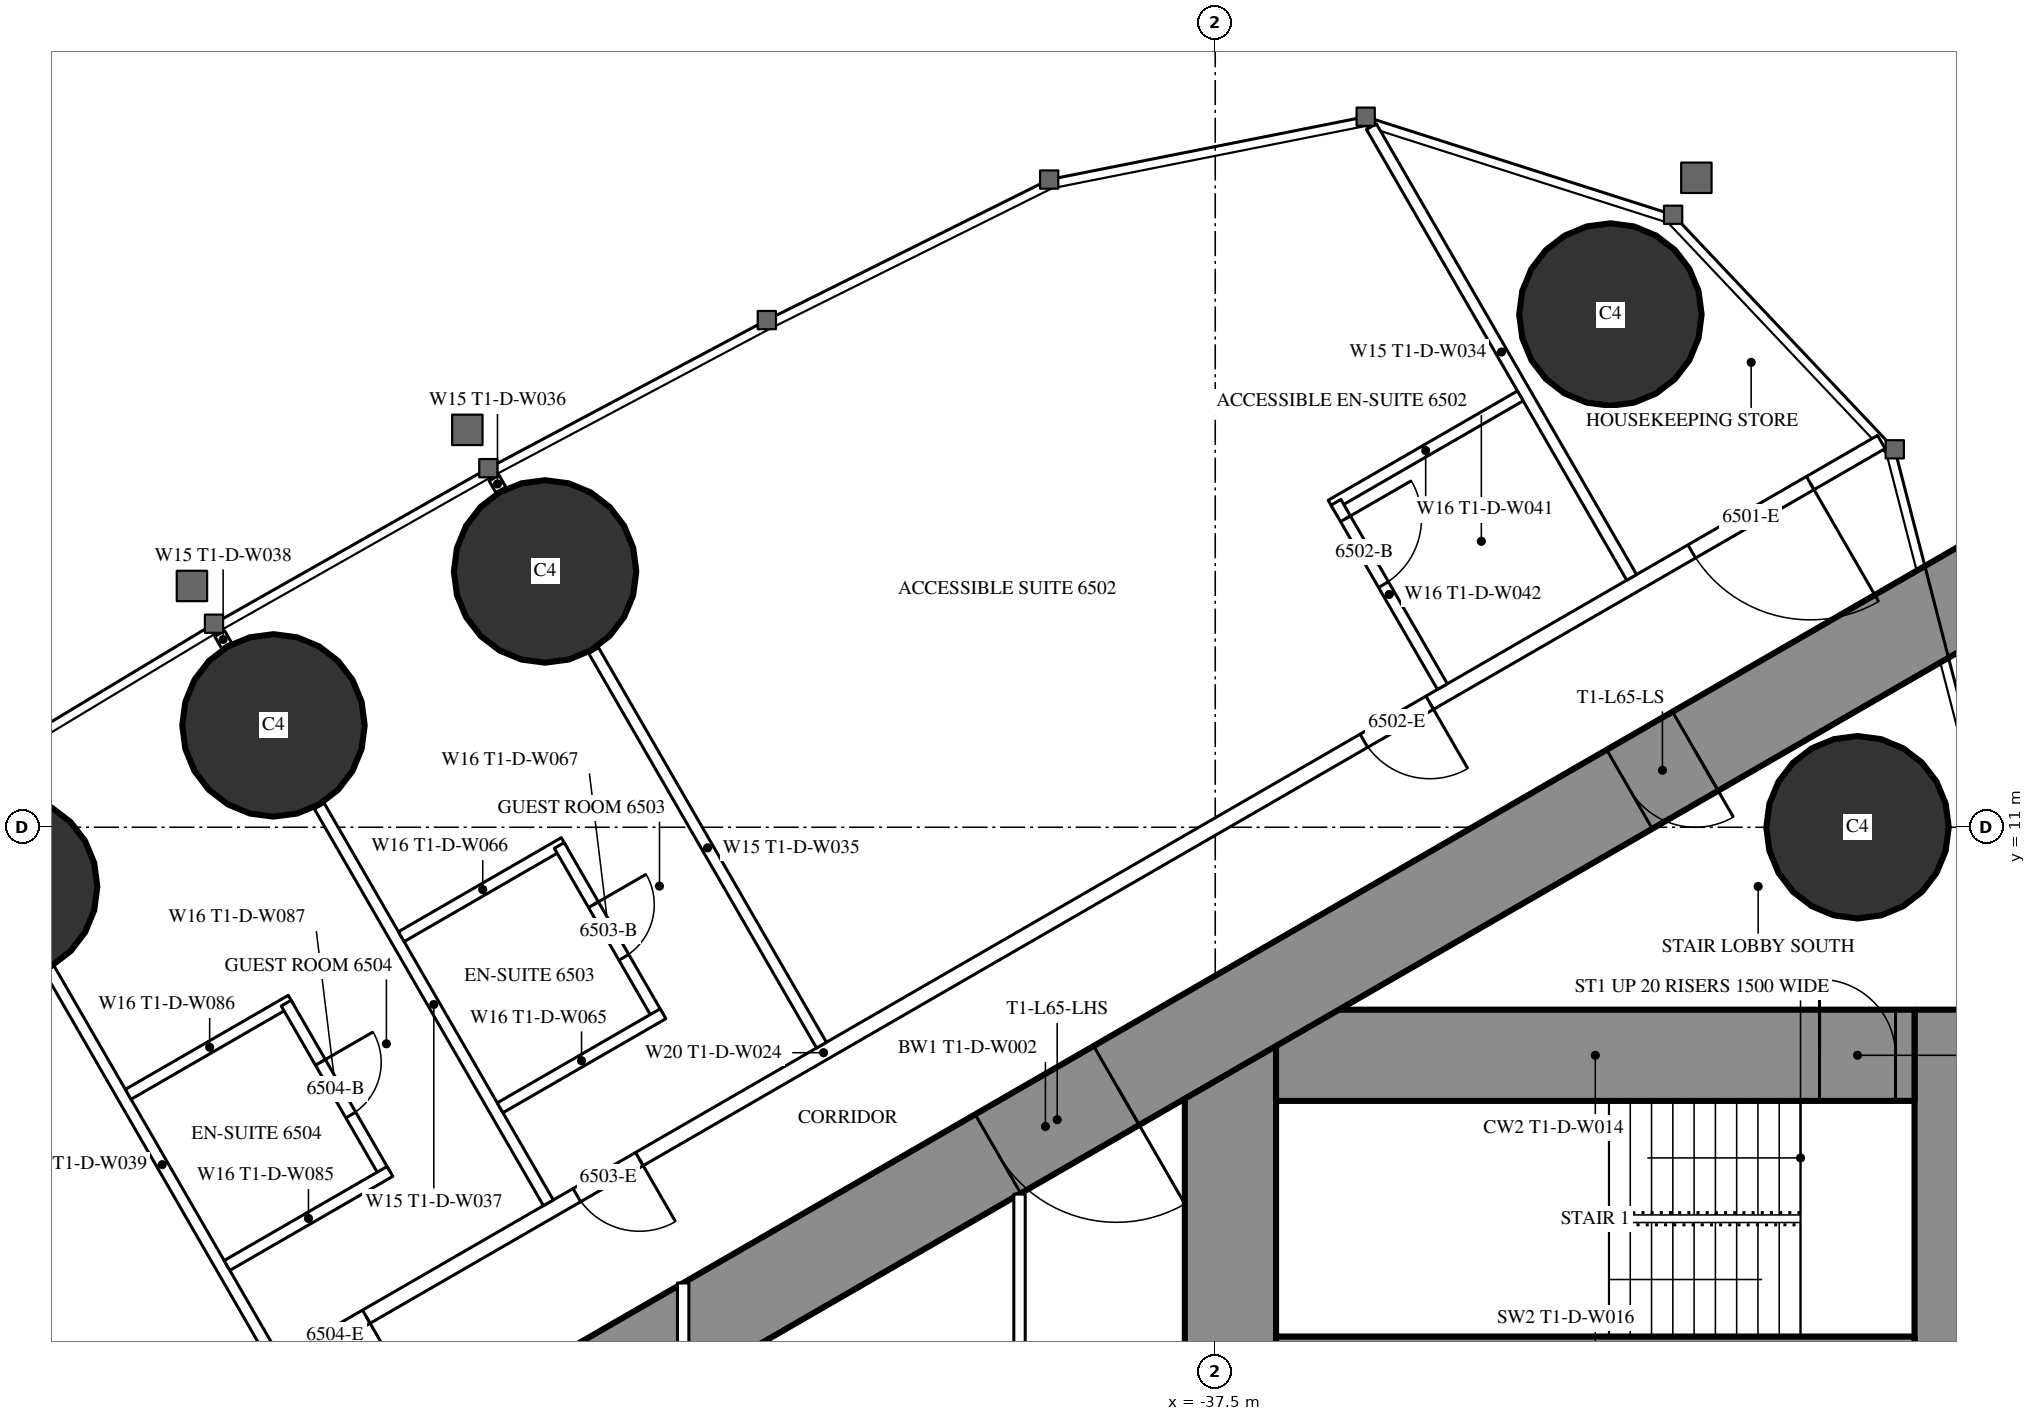
"""IFC4 building model, lengths in metres.
Left out: names, types, materials, properties, quantities, classifications, styles, units other than length and angle.
Written with IfcOpenShell. Run it as: python <this file> out.ifc"""

import sys

from ifc_helpers import new_model, si_unit, direction, frame, frame_2d, origin, origin_2d, place, context, subcontext, project, spatial, rectangle, circle, extrude, element, fill, save


model = new_model("IFC4")
c1 = context("Model", 3, precision=1e-05, world=origin(), true_north=direction((0.0, 1.0)))
c2 = subcontext(c1, "Body", "Model", "MODEL_VIEW")
j1 = project(units=[si_unit("LENGTHUNIT", "METRE"), si_unit("PLANEANGLEUNIT", "RADIAN")], contexts=[c1])
p1 = place(None, origin())
s1 = spatial("IfcSite", under=j1, at=p1, CompositionType="ELEMENT")
p2 = place(p1, origin())
s2 = spatial("IfcBuilding", under=s1, at=p2, CompositionType="ELEMENT")
p3 = place(p2, frame((0.0, 0.0, 244.1)))
s3 = spatial("IfcBuildingStorey", under=s2, at=p3, CompositionType="ELEMENT", Elevation=244.1)
for number, where, z_axis, x_axis in (
    (1, (-32.301, 17.745, 0.0), (0.0, 0.0, 1.0), (1.0, 0.0, 0.0)),
    (2, (-29.05, 11.0, 0.0), (0.0, 0.0, 1.0), (1.0, 0.0, 0.0)),
    (3, (-46.317, 14.365, 0.0), (0.0, 0.0, 1.0), (1.0, 0.0, 0.0)),
    (4, (-49.89, 12.34, 0.0), (0.0, 0.0, 1.0), (1.0, 0.0, 0.0)),
    (5, (-53.408, 10.219, 0.0), (0.0, 0.0, 1.0), (1.0, 0.0, 0.0)),
):
    element("IfcColumn", number, at=place(p3, frame(where, z_axis=z_axis, x_axis=x_axis)), inside=s3, PredefinedType="COLUMN", context=c2, shape_type="SweptSolid", body=[
        extrude(circle(Radius=1.2, at=origin_2d()), origin(), (0.0, 0.0, 1.0), 3.6),
    ])
p4 = place(p3, frame((-27.9, 8.6, 0.0), z_axis=(0.0, 0.0, 1.0), x_axis=(0.0, -1.0, 0.0)))
e6 = element("IfcWall", 6, at=p4, inside=s3, PredefinedType="SHEAR", context=c2, shape_type="SweptSolid", body=[
    extrude(rectangle(XDim=17.2, YDim=0.8, at=frame_2d((8.6, 0.0))), origin(), (0.0, 0.0, 1.0), 3.6),
])
p5 = place(p4, frame((6.95, 0.0, 0.0)))
e7 = element("IfcOpeningElement", 7, at=p5, cuts=e6, PredefinedType="OPENING", context=c2, shape_type="SweptSolid", body=[
    extrude(rectangle(XDim=0.9, YDim=2.2, at=frame_2d((0.45, 1.1))), frame((0.0, 0.41, 0.0), z_axis=(0.0, -1.0, 0.0), x_axis=(1.0, 0.0, 0.0)), (0.0, 0.0, 1.0), 0.82),
])
p6 = place(p3, frame((-37.3, 8.6, 0.0), z_axis=(0.0, 0.0, 1.0), x_axis=(0.0, -1.0, 0.0)))
e8 = element("IfcWall", 8, at=p6, inside=s3, PredefinedType="SHEAR", context=c2, shape_type="SweptSolid", body=[
    extrude(rectangle(XDim=17.2, YDim=1.2, at=frame_2d((8.6, 0.0))), origin(), (0.0, 0.0, 1.0), 3.6),
])
p7 = place(p6, frame((7.7, 0.0, 0.0)))
e9 = element("IfcOpeningElement", 9, at=p7, cuts=e8, PredefinedType="OPENING", context=c2, shape_type="SweptSolid", body=[
    extrude(rectangle(XDim=1.8, YDim=2.2, at=frame_2d((0.9, 1.1))), frame((0.0, 0.61, 0.0), z_axis=(0.0, -1.0, 0.0), x_axis=(1.0, 0.0, 0.0)), (0.0, 0.0, 1.0), 1.22),
])
p8 = place(p3, frame((-28.3, 8.0, 0.0), z_axis=(0.0, 0.0, 1.0), x_axis=(-1.0, 0.0, 0.0)))
e10 = element("IfcWall", 10, at=p8, inside=s3, PredefinedType="SHEAR", context=c2, shape_type="SweptSolid", body=[
    extrude(rectangle(XDim=8.4, YDim=1.2, at=frame_2d((4.2, 0.0))), origin(), (0.0, 0.0, 1.0), 3.6),
])
p9 = place(p8, frame((0.25, 0.0, 0.0)))
e11 = element("IfcOpeningElement", 11, at=p9, cuts=e10, PredefinedType="OPENING", context=c2, shape_type="SweptSolid", body=[
    extrude(rectangle(XDim=1.0, YDim=2.2, at=frame_2d((0.5, 1.1))), frame((0.0, 0.61, 0.0), z_axis=(0.0, -1.0, 0.0), x_axis=(1.0, 0.0, 0.0)), (0.0, 0.0, 1.0), 1.22),
])
p10 = place(p3, frame((-28.3, 4.15, 0.0), z_axis=(0.0, 0.0, 1.0), x_axis=(-1.0, 0.0, 0.0)))
e12 = element("IfcWall", 12, at=p10, inside=s3, PredefinedType="SHEAR", context=c2, shape_type="SweptSolid", body=[
    extrude(rectangle(XDim=8.4, YDim=0.3, at=frame_2d((4.2, 0.0))), origin(), (0.0, 0.0, 1.0), 3.6),
])
p11 = place(p3, frame((-27.2, 14.3, 0.0), z_axis=(0.0, 0.0, 1.0), x_axis=(-0.866026593062, -0.499997940104, 0.0)))
e13 = element("IfcWall", 13, at=p11, inside=s3, PredefinedType="SHEAR", context=c2, shape_type="SweptSolid", body=[
    extrude(rectangle(XDim=28.946, YDim=1.2, at=frame_2d((14.473, 0.0))), origin(), (0.0, 0.0, 1.0), 3.6),
])
p12 = place(p11, frame((4.6, 0.0, 0.0)))
e14 = element("IfcOpeningElement", 14, at=p12, cuts=e13, PredefinedType="OPENING", context=c2, shape_type="SweptSolid", body=[
    extrude(rectangle(XDim=1.0, YDim=2.2, at=frame_2d((0.5, 1.1))), frame((0.0, 0.61, 0.0), z_axis=(0.0, -1.0, 0.0), x_axis=(1.0, 0.0, 0.0)), (0.0, 0.0, 1.0), 1.22),
])
p13 = place(p11, frame((13.395, 0.0, 0.0)))
e15 = element("IfcOpeningElement", 15, at=p13, cuts=e13, PredefinedType="OPENING", context=c2, shape_type="SweptSolid", body=[
    extrude(rectangle(XDim=1.8, YDim=2.2, at=frame_2d((0.9, 1.1))), frame((0.0, 0.61, 0.0), z_axis=(0.0, -1.0, 0.0), x_axis=(1.0, 0.0, 0.0)), (0.0, 0.0, 1.0), 1.22),
])
p14 = place(p3, frame((-28.737, 16.068, 0.0), z_axis=(0.0, 0.0, 1.0), x_axis=(-0.866026057212, -0.499998868229, 0.0)))
e16 = element("IfcWall", 16, at=p14, inside=s3, PredefinedType="PARTITIONING", context=c2, shape_type="SweptSolid", body=[
    extrude(rectangle(XDim=32.137, YDim=0.2, at=frame_2d((16.068, 0.0))), origin(), (0.0, 0.0, 1.0), 3.35),
])
p15 = place(p14, frame((1.08, 0.0, 0.0)))
e17 = element("IfcOpeningElement", 17, at=p15, cuts=e16, PredefinedType="OPENING", context=c2, shape_type="SweptSolid", body=[
    extrude(rectangle(XDim=1.8, YDim=2.04, at=frame_2d((0.9, 1.02))), frame((0.0, 0.11, 0.0), z_axis=(0.0, -1.0, 0.0), x_axis=(1.0, 0.0, 0.0)), (0.0, 0.0, 1.0), 0.22),
])
p16 = place(p14, frame((6.86, 0.0, 0.0)))
e18 = element("IfcOpeningElement", 18, at=p16, cuts=e16, PredefinedType="OPENING", context=c2, shape_type="SweptSolid", body=[
    extrude(rectangle(XDim=1.0, YDim=2.2, at=frame_2d((0.5, 1.1))), frame((0.0, 0.11, 0.0), z_axis=(0.0, -1.0, 0.0), x_axis=(1.0, 0.0, 0.0)), (0.0, 0.0, 1.0), 0.22),
])
p17 = place(p14, frame((18.867, 0.0, 0.0)))
e19 = element("IfcOpeningElement", 19, at=p17, cuts=e16, PredefinedType="OPENING", context=c2, shape_type="SweptSolid", body=[
    extrude(rectangle(XDim=0.95, YDim=2.2, at=frame_2d((0.475, 1.1))), frame((0.0, 0.11, 0.0), z_axis=(0.0, -1.0, 0.0), x_axis=(1.0, 0.0, 0.0)), (0.0, 0.0, 1.0), 0.22),
])
p18 = place(p14, frame((23.015, 0.0, 0.0)))
e20 = element("IfcOpeningElement", 20, at=p18, cuts=e16, PredefinedType="OPENING", context=c2, shape_type="SweptSolid", body=[
    extrude(rectangle(XDim=0.95, YDim=2.2, at=frame_2d((0.475, 1.1))), frame((0.0, 0.11, 0.0), z_axis=(0.0, -1.0, 0.0), x_axis=(1.0, 0.0, 0.0)), (0.0, 0.0, 1.0), 0.22),
])
p19 = place(p14, frame((27.226, 0.0, 0.0)))
e21 = element("IfcOpeningElement", 21, at=p19, cuts=e16, PredefinedType="OPENING", context=c2, shape_type="SweptSolid", body=[
    extrude(rectangle(XDim=1.8, YDim=2.2, at=frame_2d((0.9, 1.1))), frame((0.0, 0.11, 0.0), z_axis=(0.0, -1.0, 0.0), x_axis=(1.0, 0.0, 0.0)), (0.0, 0.0, 1.0), 0.22),
])
p20 = place(p3, frame((-32.022, 14.287, 0.0), z_axis=(0.0, 0.0, 1.0), x_axis=(-0.50000019414, 0.866025291697, 0.0)))
e22 = element("IfcWall", 22, at=p20, inside=s3, PredefinedType="PARTITIONING", context=c2, shape_type="SweptSolid", body=[
    extrude(rectangle(XDim=6.848, YDim=0.15, at=frame_2d((3.424, 0.0))), origin(), (0.0, 0.0, 1.0), 3.35),
])
p21 = place(p3, frame((-42.68, 8.134, 0.0), z_axis=(0.0, 0.0, 1.0), x_axis=(-0.499984479505, 0.866034364361, 0.0)))
e23 = element("IfcWall", 23, at=p21, inside=s3, PredefinedType="PARTITIONING", context=c2, shape_type="SweptSolid", body=[
    extrude(rectangle(XDim=5.995, YDim=0.15, at=frame_2d((2.998, 0.0))), origin(), (0.0, 0.0, 1.0), 2.45),
])
p22 = place(p3, frame((-46.898, 15.439, 0.0), z_axis=(0.0, 0.0, 1.0), x_axis=(-0.500232303069, 0.865891241997, 0.0)))
e24 = element("IfcWall", 24, at=p22, inside=s3, PredefinedType="PARTITIONING", context=c2, shape_type="SweptSolid", body=[
    extrude(rectangle(XDim=0.18, YDim=0.15, at=frame_2d((0.09, 0.0))), origin(), (0.0, 0.0, 1.0), 2.45),
])
p23 = place(p3, frame((-46.274, 6.059, 0.0), z_axis=(0.0, 0.0, 1.0), x_axis=(-0.500020471368, 0.866013584312, 0.0)))
e25 = element("IfcWall", 25, at=p23, inside=s3, PredefinedType="PARTITIONING", context=c2, shape_type="SweptSolid", body=[
    extrude(rectangle(XDim=6.028, YDim=0.15, at=frame_2d((3.014, 0.0))), origin(), (0.0, 0.0, 1.0), 2.45),
])
p24 = place(p3, frame((-50.508, 13.392, 0.0), z_axis=(0.0, 0.0, 1.0), x_axis=(-0.499644091975, 0.866230789891, 0.0)))
e26 = element("IfcWall", 26, at=p24, inside=s3, PredefinedType="PARTITIONING", context=c2, shape_type="SweptSolid", body=[
    extrude(rectangle(XDim=0.18, YDim=0.15, at=frame_2d((0.09, 0.0))), origin(), (0.0, 0.0, 1.0), 2.45),
])
p25 = place(p3, frame((-49.866, 3.985, 0.0), z_axis=(0.0, 0.0, 1.0), x_axis=(-0.500000694566, 0.866025002776, 0.0)))
e27 = element("IfcWall", 27, at=p25, inside=s3, PredefinedType="PARTITIONING", context=c2, shape_type="SweptSolid", body=[
    extrude(rectangle(XDim=5.95, YDim=0.15, at=frame_2d((2.975, 0.0))), origin(), (0.0, 0.0, 1.0), 2.45),
])
p26 = place(p3, frame((-33.487, 16.675, 0.0), z_axis=(0.0, 0.0, 1.0), x_axis=(-0.866039941686, -0.499974818771, 0.0)))
e28 = element("IfcWall", 28, at=p26, inside=s3, PredefinedType="PARTITIONING", context=c2, shape_type="SweptSolid", body=[
    extrude(rectangle(XDim=2.875, YDim=0.15, at=frame_2d((1.438, 0.0))), origin(), (0.0, 0.0, 1.0), 3.35),
])
p27 = place(p3, frame((-34.511, 12.85, 0.0), z_axis=(0.0, 0.0, 1.0), x_axis=(-0.500011755427, 0.866018616679, 0.0)))
e29 = element("IfcWall", 29, at=p27, inside=s3, PredefinedType="PARTITIONING", context=c2, shape_type="SweptSolid", body=[
    extrude(rectangle(XDim=2.8, YDim=0.15, at=frame_2d((1.4, 0.0))), origin(), (0.0, 0.0, 1.0), 3.35),
])
p28 = place(p27, frame((1.55, 0.0, 0.0)))
e30 = element("IfcOpeningElement", 30, at=p28, cuts=e29, PredefinedType="OPENING", context=c2, shape_type="SweptSolid", body=[
    extrude(rectangle(XDim=1.0, YDim=2.2, at=frame_2d((0.5, 1.1))), frame((0.0, 0.085, 0.0), z_axis=(0.0, -1.0, 0.0), x_axis=(1.0, 0.0, 0.0)), (0.0, 0.0, 1.0), 0.17),
])
p29 = place(p3, frame((-46.065, 10.798, 0.0), z_axis=(0.0, 0.0, 1.0), x_axis=(-0.866031185235, -0.4999899861, 0.0)))
e31 = element("IfcWall", 31, at=p29, inside=s3, PredefinedType="PARTITIONING", context=c2, shape_type="SweptSolid", body=[
    extrude(rectangle(XDim=2.475, YDim=0.15, at=frame_2d((1.238, 0.0))), origin(), (0.0, 0.0, 1.0), 3.35),
])
p30 = place(p3, frame((-44.83, 8.509, 0.0), z_axis=(0.0, 0.0, 1.0), x_axis=(-0.499936506574, 0.866062058628, 0.0)))
e32 = element("IfcWall", 32, at=p30, inside=s3, PredefinedType="PARTITIONING", context=c2, shape_type="SweptSolid", body=[
    extrude(rectangle(XDim=2.6, YDim=0.15, at=frame_2d((1.3, 0.0))), origin(), (0.0, 0.0, 1.0), 3.35),
])
p31 = place(p30, frame((0.9, 0.0, 0.0)))
e33 = element("IfcOpeningElement", 33, at=p31, cuts=e32, PredefinedType="OPENING", context=c2, shape_type="SweptSolid", body=[
    extrude(rectangle(XDim=0.8, YDim=2.2, at=frame_2d((0.4, 1.1))), frame((0.0, 0.085, 0.0), z_axis=(0.0, -1.0, 0.0), x_axis=(1.0, 0.0, 0.0)), (0.0, 0.0, 1.0), 0.17),
])
p32 = place(p3, frame((-44.765, 8.546, 0.0), z_axis=(0.0, 0.0, 1.0), x_axis=(-0.86604923931, -0.499958713387, 0.0)))
e34 = element("IfcWall", 34, at=p32, inside=s3, PredefinedType="PARTITIONING", context=c2, shape_type="SweptSolid", body=[
    extrude(rectangle(XDim=2.475, YDim=0.15, at=frame_2d((1.237, 0.0))), origin(), (0.0, 0.0, 1.0), 3.35),
])
p33 = place(p3, frame((-49.658, 8.724, 0.0), z_axis=(0.0, 0.0, 1.0), x_axis=(-0.866031185235, -0.4999899861, 0.0)))
e35 = element("IfcWall", 35, at=p33, inside=s3, PredefinedType="PARTITIONING", context=c2, shape_type="SweptSolid", body=[
    extrude(rectangle(XDim=2.475, YDim=0.15, at=frame_2d((1.238, 0.0))), origin(), (0.0, 0.0, 1.0), 3.35),
])
p34 = place(p3, frame((-48.423, 6.435, 0.0), z_axis=(0.0, 0.0, 1.0), x_axis=(-0.500006934395, 0.866021400173, 0.0)))
e36 = element("IfcWall", 36, at=p34, inside=s3, PredefinedType="PARTITIONING", context=c2, shape_type="SweptSolid", body=[
    extrude(rectangle(XDim=2.6, YDim=0.15, at=frame_2d((1.3, 0.0))), origin(), (0.0, 0.0, 1.0), 3.35),
])
p35 = place(p34, frame((0.9, 0.0, 0.0)))
e37 = element("IfcOpeningElement", 37, at=p35, cuts=e36, PredefinedType="OPENING", context=c2, shape_type="SweptSolid", body=[
    extrude(rectangle(XDim=0.8, YDim=2.2, at=frame_2d((0.4, 1.1))), frame((0.0, 0.085, 0.0), z_axis=(0.0, -1.0, 0.0), x_axis=(1.0, 0.0, 0.0)), (0.0, 0.0, 1.0), 0.17),
])
p36 = place(p3, frame((-48.358, 6.472, 0.0), z_axis=(0.0, 0.0, 1.0), x_axis=(-0.866073894602, -0.499916002032, 0.0)))
e38 = element("IfcWall", 38, at=p36, inside=s3, PredefinedType="PARTITIONING", context=c2, shape_type="SweptSolid", body=[
    extrude(rectangle(XDim=2.475, YDim=0.15, at=frame_2d((1.238, 0.0))), origin(), (0.0, 0.0, 1.0), 3.35),
])
p37 = place(p3, frame((-40.075, 6.174, 0.0), z_axis=(0.0, 0.0, 1.0), x_axis=(0.0, -1.0, 0.0)))
e39 = element("IfcWall", 39, at=p37, inside=s3, PredefinedType="PARTITIONING", context=c2, shape_type="SweptSolid", body=[
    extrude(rectangle(XDim=12.348, YDim=0.15, at=frame_2d((6.174, 0.0))), origin(), (0.0, 0.0, 1.0), 3.35),
])
p38 = place(p37, frame((5.274, 0.0, 0.0)))
e40 = element("IfcOpeningElement", 40, at=p38, cuts=e39, PredefinedType="OPENING", context=c2, shape_type="SweptSolid", body=[
    extrude(rectangle(XDim=1.8, YDim=2.2, at=frame_2d((0.9, 1.1))), frame((0.0, 0.085, 0.0), z_axis=(0.0, -1.0, 0.0), x_axis=(1.0, 0.0, 0.0)), (0.0, 0.0, 1.0), 0.17),
])
p39 = place(p3, frame((-44.5, 5.005, 0.0), z_axis=(0.0, 0.0, 1.0), x_axis=(0.0, -1.0, 0.0)))
e41 = element("IfcWall", 41, at=p39, inside=s3, PredefinedType="PARTITIONING", context=c2, shape_type="SweptSolid", body=[
    extrude(rectangle(XDim=10.009, YDim=0.15, at=frame_2d((5.005, 0.0))), origin(), (0.0, 0.0, 1.0), 2.5),
])
p40 = place(p39, frame((2.002, 0.0, 0.0)))
e42 = element("IfcOpeningElement", 42, at=p40, cuts=e41, PredefinedType="OPENING", context=c2, shape_type="SweptSolid", body=[
    extrude(rectangle(XDim=1.0, YDim=2.2, at=frame_2d((0.5, 1.1))), frame((0.0, 0.085, 0.0), z_axis=(0.0, -1.0, 0.0), x_axis=(1.0, 0.0, 0.0)), (0.0, 0.0, 1.0), 0.17),
])
p41 = place(p39, frame((7.007, 0.0, 0.0)))
e43 = element("IfcOpeningElement", 43, at=p41, cuts=e41, PredefinedType="OPENING", context=c2, shape_type="SweptSolid", body=[
    extrude(rectangle(XDim=1.0, YDim=2.2, at=frame_2d((0.5, 1.1))), frame((0.0, 0.085, 0.0), z_axis=(0.0, -1.0, 0.0), x_axis=(1.0, 0.0, 0.0)), (0.0, 0.0, 1.0), 0.17),
])
p42 = place(p15, origin())
e44 = element("IfcDoor", 44, at=p42, inside=s3, OperationType="DOUBLE_DOOR_SINGLE_SWING", PredefinedType="DOOR", context=c2, shape_type="SweptSolid", body=[
    extrude(rectangle(XDim=1.8, YDim=2.04, at=frame_2d((0.9, 1.02))), frame((0.0, 0.025, 0.0), z_axis=(0.0, -1.0, 0.0), x_axis=(1.0, 0.0, 0.0)), (0.0, 0.0, 1.0), 0.05),
])
fill(e17, e44)
p43 = place(p28, origin())
e45 = element("IfcDoor", 45, at=p43, inside=s3, OperationType="SINGLE_SWING_RIGHT", PredefinedType="DOOR", context=c2, shape_type="SweptSolid", body=[
    extrude(rectangle(XDim=1.0, YDim=2.2, at=frame_2d((0.5, 1.1))), frame((0.0, 0.025, 0.0), z_axis=(0.0, -1.0, 0.0), x_axis=(1.0, 0.0, 0.0)), (0.0, 0.0, 1.0), 0.05),
])
fill(e30, e45)
p44 = place(p16, origin())
e46 = element("IfcDoor", 46, at=p44, inside=s3, OperationType="SINGLE_SWING_LEFT", PredefinedType="DOOR", context=c2, shape_type="SweptSolid", body=[
    extrude(rectangle(XDim=1.0, YDim=2.2, at=frame_2d((0.5, 1.1))), frame((0.0, 0.025, 0.0), z_axis=(0.0, -1.0, 0.0), x_axis=(1.0, 0.0, 0.0)), (0.0, 0.0, 1.0), 0.05),
])
fill(e18, e46)
p45 = place(p31, origin())
e47 = element("IfcDoor", 47, at=p45, inside=s3, OperationType="SINGLE_SWING_RIGHT", PredefinedType="DOOR", context=c2, shape_type="SweptSolid", body=[
    extrude(rectangle(XDim=0.8, YDim=2.2, at=frame_2d((0.4, 1.1))), frame((0.0, 0.025, 0.0), z_axis=(0.0, -1.0, 0.0), x_axis=(1.0, 0.0, 0.0)), (0.0, 0.0, 1.0), 0.05),
])
fill(e33, e47)
p46 = place(p17, origin())
e48 = element("IfcDoor", 48, at=p46, inside=s3, OperationType="SINGLE_SWING_LEFT", PredefinedType="DOOR", context=c2, shape_type="SweptSolid", body=[
    extrude(rectangle(XDim=0.95, YDim=2.2, at=frame_2d((0.475, 1.1))), frame((0.0, 0.025, 0.0), z_axis=(0.0, -1.0, 0.0), x_axis=(1.0, 0.0, 0.0)), (0.0, 0.0, 1.0), 0.05),
])
fill(e19, e48)
p47 = place(p35, origin())
e49 = element("IfcDoor", 49, at=p47, inside=s3, OperationType="SINGLE_SWING_RIGHT", PredefinedType="DOOR", context=c2, shape_type="SweptSolid", body=[
    extrude(rectangle(XDim=0.8, YDim=2.2, at=frame_2d((0.4, 1.1))), frame((0.0, 0.025, 0.0), z_axis=(0.0, -1.0, 0.0), x_axis=(1.0, 0.0, 0.0)), (0.0, 0.0, 1.0), 0.05),
])
fill(e37, e49)
p48 = place(p18, origin())
e50 = element("IfcDoor", 50, at=p48, inside=s3, OperationType="SINGLE_SWING_LEFT", PredefinedType="DOOR", context=c2, shape_type="SweptSolid", body=[
    extrude(rectangle(XDim=0.95, YDim=2.2, at=frame_2d((0.475, 1.1))), frame((0.0, 0.025, 0.0), z_axis=(0.0, -1.0, 0.0), x_axis=(1.0, 0.0, 0.0)), (0.0, 0.0, 1.0), 0.05),
])
fill(e20, e50)
p49 = place(p12, origin())
e51 = element("IfcDoor", 51, at=p49, inside=s3, OperationType="SINGLE_SWING_LEFT", PredefinedType="DOOR", context=c2, shape_type="SweptSolid", body=[
    extrude(rectangle(XDim=1.0, YDim=2.2, at=frame_2d((0.5, 1.1))), frame((0.0, 0.025, 0.0), z_axis=(0.0, -1.0, 0.0), x_axis=(1.0, 0.0, 0.0)), (0.0, 0.0, 1.0), 0.05),
])
fill(e14, e51)
p50 = place(p13, origin())
e52 = element("IfcDoor", 52, at=p50, inside=s3, OperationType="DOUBLE_DOOR_SINGLE_SWING", PredefinedType="DOOR", context=c2, shape_type="SweptSolid", body=[
    extrude(rectangle(XDim=1.8, YDim=2.2, at=frame_2d((0.9, 1.1))), frame((0.0, 0.025, 0.0), z_axis=(0.0, -1.0, 0.0), x_axis=(1.0, 0.0, 0.0)), (0.0, 0.0, 1.0), 0.05),
])
fill(e15, e52)
p51 = place(p9, origin())
e53 = element("IfcDoor", 53, at=p51, inside=s3, OperationType="SINGLE_SWING_RIGHT", PredefinedType="DOOR", context=c2, shape_type="SweptSolid", body=[
    extrude(rectangle(XDim=1.0, YDim=2.2, at=frame_2d((0.5, 1.1))), frame((0.0, 0.025, 0.0), z_axis=(0.0, -1.0, 0.0), x_axis=(1.0, 0.0, 0.0)), (0.0, 0.0, 1.0), 0.05),
])
fill(e11, e53)
save(model, sys.argv[1])
